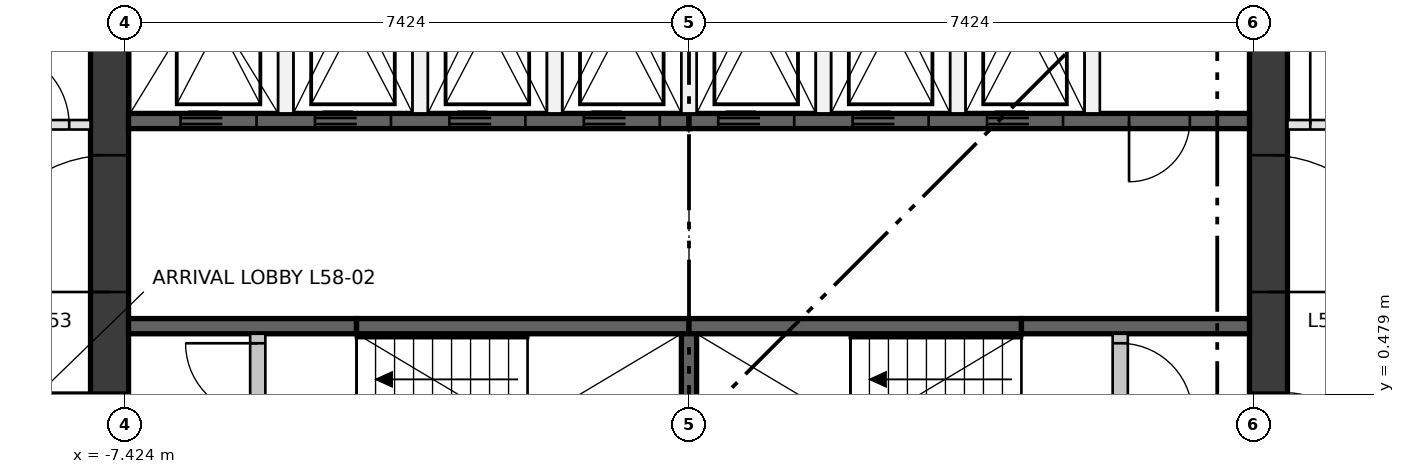
"""IFC4 building model, lengths in metres.
Left out: names, types, materials, properties, quantities, classifications, styles, units other than length and angle.
Written with IfcOpenShell. Run it as: python <this file> out.ifc"""

import sys

from ifc_helpers import new_model, si_unit, direction, frame, frame_2d, origin, place, context, subcontext, project, spatial, rectangle, extrude, element, fill, save


model = new_model("IFC4")
c1 = context("Model", 3, precision=1e-05, world=origin(), true_north=direction((0.0, 1.0)))
c2 = subcontext(c1, "Body", "Model", "MODEL_VIEW")
j1 = project(units=[si_unit("LENGTHUNIT", "METRE"), si_unit("PLANEANGLEUNIT", "RADIAN")], contexts=[c1])
p1 = place(None, origin())
s1 = spatial("IfcSite", under=j1, at=p1, CompositionType="ELEMENT")
p2 = place(p1, origin())
s2 = spatial("IfcBuilding", under=s1, at=p2, CompositionType="ELEMENT")
p3 = place(p2, frame((0.0, 0.0, 214.45)))
s3 = spatial("IfcBuildingStorey", under=s2, at=p3, CompositionType="ELEMENT", Elevation=214.45)
p4 = place(p3, frame((-7.624, -7.374, 0.0), z_axis=(0.0, 0.0, 1.0), x_axis=(0.0, 1.0, 0.0)))
e1 = element("IfcWall", 1, at=p4, inside=s3, PredefinedType="SHEAR", context=c2, shape_type="SweptSolid", body=[
    extrude(rectangle(XDim=14.748, YDim=0.5, at=frame_2d((7.374, 0.0))), origin(), (0.0, 0.0, 1.0), 3.35),
])
p5 = place(p4, frame((6.874, 0.0, 0.0)))
e2 = element("IfcOpeningElement", 2, at=p5, cuts=e1, PredefinedType="OPENING", context=c2, shape_type="SweptSolid", body=[
    extrude(rectangle(XDim=1.0, YDim=2.1, at=frame_2d((0.5, 1.05))), frame((0.0, 0.26, 0.0), z_axis=(0.0, -1.0, 0.0), x_axis=(1.0, 0.0, 0.0)), (0.0, 0.0, 1.0), 0.52),
])
p6 = place(p4, frame((3.75, 0.0, 0.0)))
e3 = element("IfcOpeningElement", 3, at=p6, cuts=e1, PredefinedType="OPENING", context=c2, shape_type="SweptSolid", body=[
    extrude(rectangle(XDim=1.8, YDim=2.1, at=frame_2d((0.9, 1.05))), frame((0.0, 0.26, 0.0), z_axis=(0.0, -1.0, 0.0), x_axis=(1.0, 0.0, 0.0)), (0.0, 0.0, 1.0), 0.52),
])
p7 = place(p4, frame((9.198, 0.0, 0.0)))
e4 = element("IfcOpeningElement", 4, at=p7, cuts=e1, PredefinedType="OPENING", context=c2, shape_type="SweptSolid", body=[
    extrude(rectangle(XDim=1.8, YDim=2.1, at=frame_2d((0.9, 1.05))), frame((0.0, 0.26, 0.0), z_axis=(0.0, -1.0, 0.0), x_axis=(1.0, 0.0, 0.0)), (0.0, 0.0, 1.0), 0.52),
])
p8 = place(p3, frame((7.624, -7.374, 0.0), z_axis=(0.0, 0.0, 1.0), x_axis=(0.0, 1.0, 0.0)))
e5 = element("IfcWall", 5, at=p8, inside=s3, PredefinedType="SHEAR", context=c2, shape_type="SweptSolid", body=[
    extrude(rectangle(XDim=14.748, YDim=0.5, at=frame_2d((7.374, 0.0))), origin(), (0.0, 0.0, 1.0), 3.35),
])
p9 = place(p8, frame((6.874, 0.0, 0.0)))
e6 = element("IfcOpeningElement", 6, at=p9, cuts=e5, PredefinedType="OPENING", context=c2, shape_type="SweptSolid", body=[
    extrude(rectangle(XDim=1.0, YDim=2.1, at=frame_2d((0.5, 1.05))), frame((0.0, 0.26, 0.0), z_axis=(0.0, -1.0, 0.0), x_axis=(1.0, 0.0, 0.0)), (0.0, 0.0, 1.0), 0.52),
])
p10 = place(p8, frame((3.75, 0.0, 0.0)))
e7 = element("IfcOpeningElement", 7, at=p10, cuts=e5, PredefinedType="OPENING", context=c2, shape_type="SweptSolid", body=[
    extrude(rectangle(XDim=1.8, YDim=2.1, at=frame_2d((0.9, 1.05))), frame((0.0, 0.26, 0.0), z_axis=(0.0, -1.0, 0.0), x_axis=(1.0, 0.0, 0.0)), (0.0, 0.0, 1.0), 0.52),
])
p11 = place(p8, frame((9.198, 0.0, 0.0)))
e8 = element("IfcOpeningElement", 8, at=p11, cuts=e5, PredefinedType="OPENING", context=c2, shape_type="SweptSolid", body=[
    extrude(rectangle(XDim=1.8, YDim=2.1, at=frame_2d((0.9, 1.05))), frame((0.0, 0.26, 0.0), z_axis=(0.0, -1.0, 0.0), x_axis=(1.0, 0.0, 0.0)), (0.0, 0.0, 1.0), 0.52),
])
p12 = place(p3, frame((-7.374, 4.074, 0.0), z_axis=(0.0, 0.0, 1.0), x_axis=(1.0, 0.0, 0.0)))
e9 = element("IfcWall", 9, at=p12, inside=s3, PredefinedType="SHEAR", context=c2, shape_type="SweptSolid", body=[
    extrude(rectangle(XDim=7.374, YDim=0.2, at=frame_2d((3.687, 0.0))), origin(), (0.0, 0.0, 1.0), 3.0),
])
p13 = place(p12, frame((0.684, 0.0, 0.0)))
e10 = element("IfcOpeningElement", 10, at=p13, cuts=e9, PredefinedType="OPENING", context=c2, shape_type="SweptSolid", body=[
    extrude(rectangle(XDim=1.0, YDim=2.1, at=frame_2d((0.5, 1.05))), frame((0.0, 0.11, 0.0), z_axis=(0.0, -1.0, 0.0), x_axis=(1.0, 0.0, 0.0)), (0.0, 0.0, 1.0), 0.22),
])
p14 = place(p12, frame((2.453, 0.0, 0.0)))
e11 = element("IfcOpeningElement", 11, at=p14, cuts=e9, PredefinedType="OPENING", context=c2, shape_type="SweptSolid", body=[
    extrude(rectangle(XDim=1.0, YDim=2.1, at=frame_2d((0.5, 1.05))), frame((0.0, 0.11, 0.0), z_axis=(0.0, -1.0, 0.0), x_axis=(1.0, 0.0, 0.0)), (0.0, 0.0, 1.0), 0.22),
])
p15 = place(p12, frame((4.221, 0.0, 0.0)))
e12 = element("IfcOpeningElement", 12, at=p15, cuts=e9, PredefinedType="OPENING", context=c2, shape_type="SweptSolid", body=[
    extrude(rectangle(XDim=1.0, YDim=2.1, at=frame_2d((0.5, 1.05))), frame((0.0, 0.11, 0.0), z_axis=(0.0, -1.0, 0.0), x_axis=(1.0, 0.0, 0.0)), (0.0, 0.0, 1.0), 0.22),
])
p16 = place(p12, frame((5.99, 0.0, 0.0)))
e13 = element("IfcOpeningElement", 13, at=p16, cuts=e9, PredefinedType="OPENING", context=c2, shape_type="SweptSolid", body=[
    extrude(rectangle(XDim=1.0, YDim=2.1, at=frame_2d((0.5, 1.05))), frame((0.0, 0.11, 0.0), z_axis=(0.0, -1.0, 0.0), x_axis=(1.0, 0.0, 0.0)), (0.0, 0.0, 1.0), 0.22),
])
p17 = place(p3, frame((0.0, 4.074, 0.0), z_axis=(0.0, 0.0, 1.0), x_axis=(1.0, 0.0, 0.0)))
e14 = element("IfcWall", 14, at=p17, inside=s3, PredefinedType="SHEAR", context=c2, shape_type="SweptSolid", body=[
    extrude(rectangle(XDim=7.374, YDim=0.2, at=frame_2d((3.687, 0.0))), origin(), (0.0, 0.0, 1.0), 3.0),
])
p18 = place(p17, frame((0.384, 0.0, 0.0)))
e15 = element("IfcOpeningElement", 15, at=p18, cuts=e14, PredefinedType="OPENING", context=c2, shape_type="SweptSolid", body=[
    extrude(rectangle(XDim=1.0, YDim=2.1, at=frame_2d((0.5, 1.05))), frame((0.0, 0.11, 0.0), z_axis=(0.0, -1.0, 0.0), x_axis=(1.0, 0.0, 0.0)), (0.0, 0.0, 1.0), 0.22),
])
p19 = place(p17, frame((2.153, 0.0, 0.0)))
e16 = element("IfcOpeningElement", 16, at=p19, cuts=e14, PredefinedType="OPENING", context=c2, shape_type="SweptSolid", body=[
    extrude(rectangle(XDim=1.0, YDim=2.1, at=frame_2d((0.5, 1.05))), frame((0.0, 0.11, 0.0), z_axis=(0.0, -1.0, 0.0), x_axis=(1.0, 0.0, 0.0)), (0.0, 0.0, 1.0), 0.22),
])
p20 = place(p17, frame((3.921, 0.0, 0.0)))
e17 = element("IfcOpeningElement", 17, at=p20, cuts=e14, PredefinedType="OPENING", context=c2, shape_type="SweptSolid", body=[
    extrude(rectangle(XDim=1.0, YDim=2.1, at=frame_2d((0.5, 1.05))), frame((0.0, 0.11, 0.0), z_axis=(0.0, -1.0, 0.0), x_axis=(1.0, 0.0, 0.0)), (0.0, 0.0, 1.0), 0.22),
])
p21 = place(p17, frame((5.79, 0.0, 0.0)))
e18 = element("IfcOpeningElement", 18, at=p21, cuts=e14, PredefinedType="OPENING", context=c2, shape_type="SweptSolid", body=[
    extrude(rectangle(XDim=0.8, YDim=2.1, at=frame_2d((0.4, 1.05))), frame((0.0, 0.11, 0.0), z_axis=(0.0, -1.0, 0.0), x_axis=(1.0, 0.0, 0.0)), (0.0, 0.0, 1.0), 0.22),
])
p22 = place(p3, frame((-7.374, 1.375, 0.0), z_axis=(0.0, 0.0, 1.0), x_axis=(1.0, 0.0, 0.0)))
e19 = element("IfcWall", 19, at=p22, inside=s3, PredefinedType="SHEAR", context=c2, shape_type="SweptSolid", body=[
    extrude(rectangle(XDim=3.0, YDim=0.2, at=frame_2d((1.5, 0.0))), origin(), (0.0, 0.0, 1.0), 3.0),
])
for number, where, z_axis, x_axis in (
    (20, (-4.374, 1.375, 0.0), (0.0, 0.0, 1.0), (1.0, 0.0, 0.0)),
    (21, (0.0, 1.375, 0.0), (0.0, 0.0, 1.0), (1.0, 0.0, 0.0)),
):
    element("IfcWall", number, at=place(p3, frame(where, z_axis=z_axis, x_axis=x_axis)), inside=s3, PredefinedType="SHEAR", context=c2, shape_type="SweptSolid", body=[
        extrude(rectangle(XDim=4.374, YDim=0.2, at=frame_2d((2.187, 0.0))), origin(), (0.0, 0.0, 1.0), 3.0),
    ])
p23 = place(p3, frame((4.374, 1.375, 0.0), z_axis=(0.0, 0.0, 1.0), x_axis=(1.0, 0.0, 0.0)))
e22 = element("IfcWall", 22, at=p23, inside=s3, PredefinedType="SHEAR", context=c2, shape_type="SweptSolid", body=[
    extrude(rectangle(XDim=3.0, YDim=0.2, at=frame_2d((1.5, 0.0))), origin(), (0.0, 0.0, 1.0), 3.0),
])
p24 = place(p3, frame((0.0, -1.275, 0.0), z_axis=(0.0, 0.0, 1.0), x_axis=(0.0, 1.0, 0.0)))
e23 = element("IfcWall", 23, at=p24, inside=s3, PredefinedType="SHEAR", context=c2, shape_type="SweptSolid", body=[
    extrude(rectangle(XDim=2.55, YDim=0.2, at=frame_2d((1.275, 0.0))), origin(), (0.0, 0.0, 1.0), 3.0),
])
for number, where, z_axis, x_axis in (
    (24, (-5.305, 4.174, 0.0), (0.0, 0.0, 1.0), (0.0, 1.0, 0.0)),
    (25, (-3.537, 4.174, 0.0), (0.0, 0.0, 1.0), (0.0, 1.0, 0.0)),
    (26, (-1.769, 4.174, 0.0), (0.0, 0.0, 1.0), (0.0, 1.0, 0.0)),
    (27, (0.0, 4.174, 0.0), (0.0, 0.0, 1.0), (0.0, 1.0, 0.0)),
    (28, (1.769, 4.174, 0.0), (0.0, 0.0, 1.0), (0.0, 1.0, 0.0)),
    (29, (3.537, 4.174, 0.0), (0.0, 0.0, 1.0), (0.0, 1.0, 0.0)),
    (30, (5.305, 4.174, 0.0), (0.0, 0.0, 1.0), (0.0, 1.0, 0.0)),
):
    element("IfcWall", number, at=place(p3, frame(where, z_axis=z_axis, x_axis=x_axis)), inside=s3, PredefinedType="PARTITIONING", context=c2, shape_type="SweptSolid", body=[
        extrude(rectangle(XDim=3.2, YDim=0.2, at=frame_2d((1.6, 0.0))), origin(), (0.0, 0.0, 1.0), 3.0),
    ])
p25 = place(p3, frame((-5.674, -1.275, 0.0), z_axis=(0.0, 0.0, 1.0), x_axis=(0.0, 1.0, 0.0)))
e31 = element("IfcWall", 31, at=p25, inside=s3, PredefinedType="PARTITIONING", context=c2, shape_type="SweptSolid", body=[
    extrude(rectangle(XDim=2.55, YDim=0.2, at=frame_2d((1.275, 0.0))), origin(), (0.0, 0.0, 1.0), 3.0),
])
p26 = place(p25, frame((0.125, 0.0, 0.0)))
e32 = element("IfcOpeningElement", 32, at=p26, cuts=e31, PredefinedType="OPENING", context=c2, shape_type="SweptSolid", body=[
    extrude(rectangle(XDim=0.95, YDim=2.1, at=frame_2d((0.475, 1.05))), frame((0.0, 0.11, 0.0), z_axis=(0.0, -1.0, 0.0), x_axis=(1.0, 0.0, 0.0)), (0.0, 0.0, 1.0), 0.22),
])
p27 = place(p25, frame((1.475, 0.0, 0.0)))
e33 = element("IfcOpeningElement", 33, at=p27, cuts=e31, PredefinedType="OPENING", context=c2, shape_type="SweptSolid", body=[
    extrude(rectangle(XDim=0.95, YDim=2.1, at=frame_2d((0.475, 1.05))), frame((0.0, 0.11, 0.0), z_axis=(0.0, -1.0, 0.0), x_axis=(1.0, 0.0, 0.0)), (0.0, 0.0, 1.0), 0.22),
])
p28 = place(p3, frame((5.674, -1.275, 0.0), z_axis=(0.0, 0.0, 1.0), x_axis=(0.0, 1.0, 0.0)))
e34 = element("IfcWall", 34, at=p28, inside=s3, PredefinedType="PARTITIONING", context=c2, shape_type="SweptSolid", body=[
    extrude(rectangle(XDim=2.55, YDim=0.2, at=frame_2d((1.275, 0.0))), origin(), (0.0, 0.0, 1.0), 3.0),
])
p29 = place(p28, frame((0.125, 0.0, 0.0)))
e35 = element("IfcOpeningElement", 35, at=p29, cuts=e34, PredefinedType="OPENING", context=c2, shape_type="SweptSolid", body=[
    extrude(rectangle(XDim=0.95, YDim=2.1, at=frame_2d((0.475, 1.05))), frame((0.0, 0.11, 0.0), z_axis=(0.0, -1.0, 0.0), x_axis=(1.0, 0.0, 0.0)), (0.0, 0.0, 1.0), 0.22),
])
p30 = place(p28, frame((1.475, 0.0, 0.0)))
e36 = element("IfcOpeningElement", 36, at=p30, cuts=e34, PredefinedType="OPENING", context=c2, shape_type="SweptSolid", body=[
    extrude(rectangle(XDim=0.95, YDim=2.1, at=frame_2d((0.475, 1.05))), frame((0.0, 0.11, 0.0), z_axis=(0.0, -1.0, 0.0), x_axis=(1.0, 0.0, 0.0)), (0.0, 0.0, 1.0), 0.22),
])
p31 = place(p3, frame((7.874, 4.024, 0.0), z_axis=(0.0, 0.0, 1.0), x_axis=(1.0, 0.0, 0.0)))
e37 = element("IfcWall", 37, at=p31, inside=s3, PredefinedType="PARTITIONING", context=c2, shape_type="SweptSolid", body=[
    extrude(rectangle(XDim=2.475, YDim=0.125, at=frame_2d((1.238, 0.0))), origin(), (0.0, 0.0, 1.0), 3.0),
])
p32 = place(p31, frame((0.3, 0.0, 0.0)))
e38 = element("IfcOpeningElement", 38, at=p32, cuts=e37, PredefinedType="OPENING", context=c2, shape_type="SweptSolid", body=[
    extrude(rectangle(XDim=1.0, YDim=2.1, at=frame_2d((0.5, 1.05))), frame((0.0, 0.073, 0.0), z_axis=(0.0, -1.0, 0.0), x_axis=(1.0, 0.0, 0.0)), (0.0, 0.0, 1.0), 0.145),
])
p33 = place(p3, frame((-9.436, 4.024, 0.0), z_axis=(0.0, 0.0, 1.0), x_axis=(1.0, 0.0, 0.0)))
e39 = element("IfcWall", 39, at=p33, inside=s3, PredefinedType="PARTITIONING", context=c2, shape_type="SweptSolid", body=[
    extrude(rectangle(XDim=1.562, YDim=0.125, at=frame_2d((0.781, 0.0))), origin(), (0.0, 0.0, 1.0), 3.0),
])
p34 = place(p33, frame((0.281, 0.0, 0.0)))
e40 = element("IfcOpeningElement", 40, at=p34, cuts=e39, PredefinedType="OPENING", context=c2, shape_type="SweptSolid", body=[
    extrude(rectangle(XDim=1.0, YDim=2.1, at=frame_2d((0.5, 1.05))), frame((0.0, 0.073, 0.0), z_axis=(0.0, -1.0, 0.0), x_axis=(1.0, 0.0, 0.0)), (0.0, 0.0, 1.0), 0.145),
])
p35 = place(p13, frame((1.0, 0.0, 0.0), z_axis=(0.0, 0.0, 1.0), x_axis=(-1.0, 0.0, 0.0)))
e41 = element("IfcDoor", 41, at=p35, inside=s3, OperationType="DOUBLE_DOOR_SLIDING", PredefinedType="DOOR", context=c2, shape_type="SweptSolid", body=[
    extrude(rectangle(XDim=1.0, YDim=2.1, at=frame_2d((0.5, 1.05))), frame((0.0, 0.025, 0.0), z_axis=(0.0, -1.0, 0.0), x_axis=(1.0, 0.0, 0.0)), (0.0, 0.0, 1.0), 0.05),
])
fill(e10, e41)
p36 = place(p14, frame((1.0, 0.0, 0.0), z_axis=(0.0, 0.0, 1.0), x_axis=(-1.0, 0.0, 0.0)))
e42 = element("IfcDoor", 42, at=p36, inside=s3, OperationType="DOUBLE_DOOR_SLIDING", PredefinedType="DOOR", context=c2, shape_type="SweptSolid", body=[
    extrude(rectangle(XDim=1.0, YDim=2.1, at=frame_2d((0.5, 1.05))), frame((0.0, 0.025, 0.0), z_axis=(0.0, -1.0, 0.0), x_axis=(1.0, 0.0, 0.0)), (0.0, 0.0, 1.0), 0.05),
])
fill(e11, e42)
p37 = place(p15, frame((1.0, 0.0, 0.0), z_axis=(0.0, 0.0, 1.0), x_axis=(-1.0, 0.0, 0.0)))
e43 = element("IfcDoor", 43, at=p37, inside=s3, OperationType="DOUBLE_DOOR_SLIDING", PredefinedType="DOOR", context=c2, shape_type="SweptSolid", body=[
    extrude(rectangle(XDim=1.0, YDim=2.1, at=frame_2d((0.5, 1.05))), frame((0.0, 0.025, 0.0), z_axis=(0.0, -1.0, 0.0), x_axis=(1.0, 0.0, 0.0)), (0.0, 0.0, 1.0), 0.05),
])
fill(e12, e43)
p38 = place(p16, frame((1.0, 0.0, 0.0), z_axis=(0.0, 0.0, 1.0), x_axis=(-1.0, 0.0, 0.0)))
e44 = element("IfcDoor", 44, at=p38, inside=s3, OperationType="DOUBLE_DOOR_SLIDING", PredefinedType="DOOR", context=c2, shape_type="SweptSolid", body=[
    extrude(rectangle(XDim=1.0, YDim=2.1, at=frame_2d((0.5, 1.05))), frame((0.0, 0.025, 0.0), z_axis=(0.0, -1.0, 0.0), x_axis=(1.0, 0.0, 0.0)), (0.0, 0.0, 1.0), 0.05),
])
fill(e13, e44)
p39 = place(p18, frame((1.0, 0.0, 0.0), z_axis=(0.0, 0.0, 1.0), x_axis=(-1.0, 0.0, 0.0)))
e45 = element("IfcDoor", 45, at=p39, inside=s3, OperationType="DOUBLE_DOOR_SLIDING", PredefinedType="DOOR", context=c2, shape_type="SweptSolid", body=[
    extrude(rectangle(XDim=1.0, YDim=2.1, at=frame_2d((0.5, 1.05))), frame((0.0, 0.025, 0.0), z_axis=(0.0, -1.0, 0.0), x_axis=(1.0, 0.0, 0.0)), (0.0, 0.0, 1.0), 0.05),
])
fill(e15, e45)
p40 = place(p19, frame((1.0, 0.0, 0.0), z_axis=(0.0, 0.0, 1.0), x_axis=(-1.0, 0.0, 0.0)))
e46 = element("IfcDoor", 46, at=p40, inside=s3, OperationType="DOUBLE_DOOR_SLIDING", PredefinedType="DOOR", context=c2, shape_type="SweptSolid", body=[
    extrude(rectangle(XDim=1.0, YDim=2.1, at=frame_2d((0.5, 1.05))), frame((0.0, 0.025, 0.0), z_axis=(0.0, -1.0, 0.0), x_axis=(1.0, 0.0, 0.0)), (0.0, 0.0, 1.0), 0.05),
])
fill(e16, e46)
p41 = place(p20, frame((1.0, 0.0, 0.0), z_axis=(0.0, 0.0, 1.0), x_axis=(-1.0, 0.0, 0.0)))
e47 = element("IfcDoor", 47, at=p41, inside=s3, OperationType="DOUBLE_DOOR_SLIDING", PredefinedType="DOOR", context=c2, shape_type="SweptSolid", body=[
    extrude(rectangle(XDim=1.0, YDim=2.1, at=frame_2d((0.5, 1.05))), frame((0.0, 0.025, 0.0), z_axis=(0.0, -1.0, 0.0), x_axis=(1.0, 0.0, 0.0)), (0.0, 0.0, 1.0), 0.05),
])
fill(e17, e47)
p42 = place(p27, origin())
e48 = element("IfcDoor", 48, at=p42, inside=s3, OperationType="SINGLE_SWING_RIGHT", PredefinedType="DOOR", context=c2, shape_type="SweptSolid", body=[
    extrude(rectangle(XDim=0.95, YDim=2.1, at=frame_2d((0.475, 1.05))), frame((0.0, 0.025, 0.0), z_axis=(0.0, -1.0, 0.0), x_axis=(1.0, 0.0, 0.0)), (0.0, 0.0, 1.0), 0.05),
])
fill(e33, e48)
p43 = place(p30, frame((0.95, 0.0, 0.0), z_axis=(0.0, 0.0, 1.0), x_axis=(-1.0, 0.0, 0.0)))
e49 = element("IfcDoor", 49, at=p43, inside=s3, OperationType="SINGLE_SWING_LEFT", PredefinedType="DOOR", context=c2, shape_type="SweptSolid", body=[
    extrude(rectangle(XDim=0.95, YDim=2.1, at=frame_2d((0.475, 1.05))), frame((0.0, 0.025, 0.0), z_axis=(0.0, -1.0, 0.0), x_axis=(1.0, 0.0, 0.0)), (0.0, 0.0, 1.0), 0.05),
])
fill(e36, e49)
p44 = place(p21, frame((0.8, 0.0, 0.0), z_axis=(0.0, 0.0, 1.0), x_axis=(-1.0, 0.0, 0.0)))
e50 = element("IfcDoor", 50, at=p44, inside=s3, OperationType="SINGLE_SWING_LEFT", PredefinedType="DOOR", context=c2, shape_type="SweptSolid", body=[
    extrude(rectangle(XDim=0.8, YDim=2.1, at=frame_2d((0.4, 1.05))), frame((0.0, 0.025, 0.0), z_axis=(0.0, -1.0, 0.0), x_axis=(1.0, 0.0, 0.0)), (0.0, 0.0, 1.0), 0.05),
])
fill(e18, e50)
p45 = place(p5, origin())
e51 = element("IfcDoor", 51, at=p45, inside=s3, OperationType="SINGLE_SWING_RIGHT", PredefinedType="DOOR", context=c2, shape_type="SweptSolid", body=[
    extrude(rectangle(XDim=1.0, YDim=2.1, at=frame_2d((0.5, 1.05))), frame((0.0, 0.25, 0.0), z_axis=(0.0, -1.0, 0.0), x_axis=(1.0, 0.0, 0.0)), (0.0, 0.0, 1.0), 0.05),
])
fill(e2, e51)
p46 = place(p7, origin())
e52 = element("IfcDoor", 52, at=p46, inside=s3, OperationType="DOUBLE_DOOR_SINGLE_SWING", PredefinedType="DOOR", context=c2, shape_type="SweptSolid", body=[
    extrude(rectangle(XDim=1.8, YDim=2.1, at=frame_2d((0.9, 1.05))), frame((0.0, 0.025, 0.0), z_axis=(0.0, -1.0, 0.0), x_axis=(1.0, 0.0, 0.0)), (0.0, 0.0, 1.0), 0.05),
])
fill(e4, e52)
p47 = place(p9, frame((1.0, 0.0, 0.0), z_axis=(0.0, 0.0, 1.0), x_axis=(-1.0, 0.0, 0.0)))
e53 = element("IfcDoor", 53, at=p47, inside=s3, OperationType="SINGLE_SWING_LEFT", PredefinedType="DOOR", context=c2, shape_type="SweptSolid", body=[
    extrude(rectangle(XDim=1.0, YDim=2.1, at=frame_2d((0.5, 1.05))), frame((0.0, 0.25, 0.0), z_axis=(0.0, -1.0, 0.0), x_axis=(1.0, 0.0, 0.0)), (0.0, 0.0, 1.0), 0.05),
])
fill(e6, e53)
p48 = place(p11, frame((1.8, 0.0, 0.0), z_axis=(0.0, 0.0, 1.0), x_axis=(-1.0, 0.0, 0.0)))
e54 = element("IfcDoor", 54, at=p48, inside=s3, OperationType="DOUBLE_DOOR_SINGLE_SWING", PredefinedType="DOOR", context=c2, shape_type="SweptSolid", body=[
    extrude(rectangle(XDim=1.8, YDim=2.1, at=frame_2d((0.9, 1.05))), frame((0.0, 0.025, 0.0), z_axis=(0.0, -1.0, 0.0), x_axis=(1.0, 0.0, 0.0)), (0.0, 0.0, 1.0), 0.05),
])
fill(e8, e54)
p49 = place(p32, origin())
e55 = element("IfcDoor", 55, at=p49, inside=s3, OperationType="SINGLE_SWING_LEFT", PredefinedType="DOOR", context=c2, shape_type="SweptSolid", body=[
    extrude(rectangle(XDim=1.0, YDim=2.1, at=frame_2d((0.5, 1.05))), frame((0.0, 0.025, 0.0), z_axis=(0.0, -1.0, 0.0), x_axis=(1.0, 0.0, 0.0)), (0.0, 0.0, 1.0), 0.05),
])
fill(e38, e55)
p50 = place(p34, origin())
e56 = element("IfcDoor", 56, at=p50, inside=s3, OperationType="SINGLE_SWING_LEFT", PredefinedType="DOOR", context=c2, shape_type="SweptSolid", body=[
    extrude(rectangle(XDim=1.0, YDim=2.1, at=frame_2d((0.5, 1.05))), frame((0.0, 0.025, 0.0), z_axis=(0.0, -1.0, 0.0), x_axis=(1.0, 0.0, 0.0)), (0.0, 0.0, 1.0), 0.05),
])
fill(e40, e56)
save(model, sys.argv[1])
